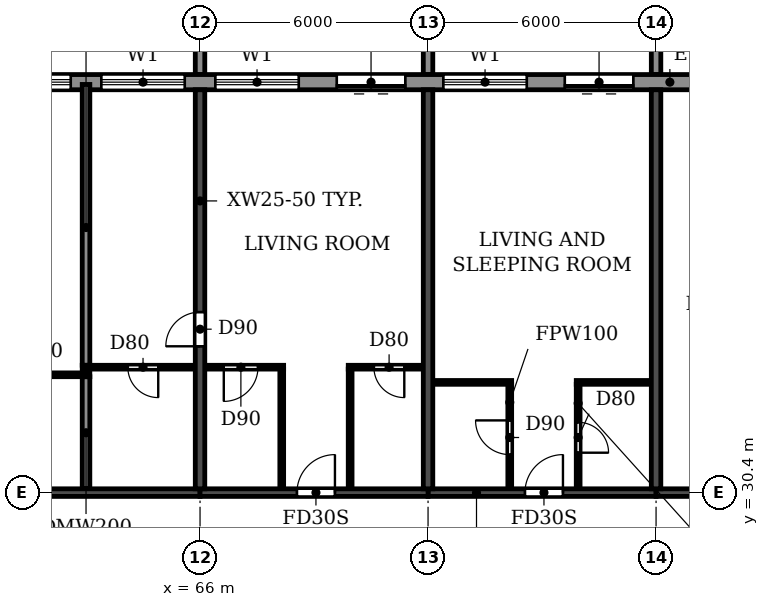
"""IFC4 building model, lengths in metres.
Left out: names, types, materials, properties, quantities, classifications, styles, units other than length and angle.
Written with IfcOpenShell. Run it as: python <this file> out.ifc"""

import sys

from ifc_helpers import new_model, si_unit, direction, frame, frame_2d, origin, place, context, subcontext, project, spatial, polyline, rectangle, outline, extrude, source, transform, mapped, element, fill, save


model = new_model("IFC4")
c1 = context("Model", 3, precision=1e-05, world=origin(), true_north=direction((0.0, 1.0)))
c2 = subcontext(c1, "Body", "Model", "MODEL_VIEW")
j1 = project(units=[si_unit("LENGTHUNIT", "METRE"), si_unit("PLANEANGLEUNIT", "RADIAN")], contexts=[c1])
p1 = place(None, origin())
s1 = spatial("IfcSite", under=j1, at=p1, CompositionType="ELEMENT")
p2 = place(p1, origin())
s2 = spatial("IfcBuilding", under=s1, at=p2, CompositionType="ELEMENT")
p3 = place(p2, frame((0.0, 0.0, 251.1)))
s3 = spatial("IfcBuildingStorey", under=s2, at=p3, CompositionType="ELEMENT", Elevation=251.1)
p4 = place(p3, frame((66.0, 30.5, 0.0), z_axis=(0.0, 0.0, 1.0), x_axis=(0.0, 1.0, 0.0)))
e1 = element("IfcWall", 1, at=p4, inside=s3, PredefinedType="SHEAR", context=c2, shape_type="SweptSolid", body=[
    extrude(rectangle(XDim=10.5, YDim=0.25, at=frame_2d((5.25, 0.0))), origin(), (0.0, 0.0, 1.0), 3.08),
])
p5 = place(p4, frame((3.75, 0.0, 0.0)))
e2 = element("IfcOpeningElement", 2, at=p5, cuts=e1, PredefinedType="OPENING", context=c2, shape_type="SweptSolid", body=[
    extrude(rectangle(XDim=0.9, YDim=2.1, at=frame_2d((0.45, 1.05))), frame((0.0, 0.135, 0.0), z_axis=(0.0, -1.0, 0.0), x_axis=(1.0, 0.0, 0.0)), (0.0, 0.0, 1.0), 0.27),
])
for number, where, z_axis, x_axis in (
    (3, (72.0, 30.5, 0.0), (0.0, 0.0, 1.0), (0.0, 1.0, 0.0)),
    (4, (78.0, 30.5, 0.0), (0.0, 0.0, 1.0), (0.0, 1.0, 0.0)),
):
    element("IfcWall", number, at=place(p3, frame(where, z_axis=z_axis, x_axis=x_axis)), inside=s3, PredefinedType="SHEAR", context=c2, shape_type="SweptSolid", body=[
        extrude(rectangle(XDim=10.5, YDim=0.25, at=frame_2d((5.25, 0.0))), origin(), (0.0, 0.0, 1.0), 3.08),
    ])
p6 = place(p3, frame((60.0, 30.4, 0.0), z_axis=(0.0, 0.0, 1.0), x_axis=(1.0, 0.0, 0.0)))
e5 = element("IfcWall", 5, at=p6, inside=s3, PredefinedType="SHEAR", context=c2, shape_type="SweptSolid", body=[
    extrude(rectangle(XDim=6.0, YDim=0.2, at=frame_2d((3.0, 0.0))), origin(), (0.0, 0.0, 1.0), 2.48),
])
p7 = place(p3, frame((66.0, 30.4, 0.0), z_axis=(0.0, 0.0, 1.0), x_axis=(1.0, 0.0, 0.0)))
e6 = element("IfcWall", 6, at=p7, inside=s3, PredefinedType="SHEAR", context=c2, shape_type="SweptSolid", body=[
    extrude(rectangle(XDim=6.0, YDim=0.2, at=frame_2d((3.0, 0.0))), origin(), (0.0, 0.0, 1.0), 2.48),
])
p8 = place(p7, frame((2.55, 0.0, 0.0)))
e7 = element("IfcOpeningElement", 7, at=p8, cuts=e6, PredefinedType="OPENING", context=c2, shape_type="SweptSolid", body=[
    extrude(rectangle(XDim=1.0, YDim=2.1, at=frame_2d((0.5, 1.05))), frame((0.0, 0.11, 0.0), z_axis=(0.0, -1.0, 0.0), x_axis=(1.0, 0.0, 0.0)), (0.0, 0.0, 1.0), 0.22),
])
p9 = place(p3, frame((72.0, 30.4, 0.0), z_axis=(0.0, 0.0, 1.0), x_axis=(1.0, 0.0, 0.0)))
e8 = element("IfcWall", 8, at=p9, inside=s3, PredefinedType="SHEAR", context=c2, shape_type="SweptSolid", body=[
    extrude(rectangle(XDim=6.0, YDim=0.2, at=frame_2d((3.0, 0.0))), origin(), (0.0, 0.0, 1.0), 2.48),
])
p10 = place(p9, frame((2.55, 0.0, 0.0)))
e9 = element("IfcOpeningElement", 9, at=p10, cuts=e8, PredefinedType="OPENING", context=c2, shape_type="SweptSolid", body=[
    extrude(rectangle(XDim=1.0, YDim=2.1, at=frame_2d((0.5, 1.05))), frame((0.0, 0.11, 0.0), z_axis=(0.0, -1.0, 0.0), x_axis=(1.0, 0.0, 0.0)), (0.0, 0.0, 1.0), 0.22),
])
p11 = place(p3, frame((78.0, 30.4, 0.0), z_axis=(0.0, 0.0, 1.0), x_axis=(1.0, 0.0, 0.0)))
e10 = element("IfcWall", 10, at=p11, inside=s3, PredefinedType="SHEAR", context=c2, shape_type="SweptSolid", body=[
    extrude(rectangle(XDim=5.8, YDim=0.2, at=frame_2d((2.9, 0.0))), origin(), (0.0, 0.0, 1.0), 2.48),
])
p12 = place(p11, frame((2.5, 0.0, 0.0)))
e11 = element("IfcOpeningElement", 11, at=p12, cuts=e10, PredefinedType="OPENING", context=c2, shape_type="SweptSolid", body=[
    extrude(rectangle(XDim=1.0, YDim=2.1, at=frame_2d((0.5, 1.05))), frame((0.0, 0.11, 0.0), z_axis=(0.0, -1.0, 0.0), x_axis=(1.0, 0.0, 0.0)), (0.0, 0.0, 1.0), 0.22),
])
p13 = place(p3, frame((79.317, 41.2, 0.0), z_axis=(0.0, 0.0, 1.0), x_axis=(-1.0, 0.0, 0.0)))
e12 = element("IfcWall", 12, at=p13, inside=s3, PredefinedType="STANDARD", context=c2, shape_type="SweptSolid", body=[
    extrude(rectangle(XDim=56.634, YDim=0.4, at=frame_2d((28.317, 0.0))), origin(), (0.0, 0.0, 1.0), 3.08),
])
p14 = place(p13, frame((52.717, 0.0, 0.9)))
e13 = element("IfcOpeningElement", 13, at=p14, cuts=e12, PredefinedType="OPENING", context=c2, shape_type="SweptSolid", body=[
    extrude(rectangle(XDim=2.2, YDim=1.5, at=frame_2d((1.1, 0.75))), frame((0.0, 0.21, 0.0), z_axis=(0.0, -1.0, 0.0), x_axis=(1.0, 0.0, 0.0)), (0.0, 0.0, 1.0), 0.42),
])
p15 = place(p13, frame((49.717, 0.0, 0.9)))
e14 = element("IfcOpeningElement", 14, at=p15, cuts=e12, PredefinedType="OPENING", context=c2, shape_type="SweptSolid", body=[
    extrude(rectangle(XDim=2.2, YDim=1.5, at=frame_2d((1.1, 0.75))), frame((0.0, 0.21, 0.0), z_axis=(0.0, -1.0, 0.0), x_axis=(1.0, 0.0, 0.0)), (0.0, 0.0, 1.0), 0.42),
])
p16 = place(p13, frame((46.717, 0.0, 0.9)))
e15 = element("IfcOpeningElement", 15, at=p16, cuts=e12, PredefinedType="OPENING", context=c2, shape_type="SweptSolid", body=[
    extrude(rectangle(XDim=2.2, YDim=1.5, at=frame_2d((1.1, 0.75))), frame((0.0, 0.21, 0.0), z_axis=(0.0, -1.0, 0.0), x_axis=(1.0, 0.0, 0.0)), (0.0, 0.0, 1.0), 0.42),
])
p17 = place(p13, frame((43.917, 0.0, 0.0)))
e16 = element("IfcOpeningElement", 16, at=p17, cuts=e12, PredefinedType="OPENING", context=c2, shape_type="SweptSolid", body=[
    extrude(rectangle(XDim=1.8, YDim=2.4, at=frame_2d((0.9, 1.2))), frame((0.0, 0.21, 0.0), z_axis=(0.0, -1.0, 0.0), x_axis=(1.0, 0.0, 0.0)), (0.0, 0.0, 1.0), 0.42),
])
p18 = place(p13, frame((40.717, 0.0, 0.9)))
e17 = element("IfcOpeningElement", 17, at=p18, cuts=e12, PredefinedType="OPENING", context=c2, shape_type="SweptSolid", body=[
    extrude(rectangle(XDim=2.2, YDim=1.5, at=frame_2d((1.1, 0.75))), frame((0.0, 0.21, 0.0), z_axis=(0.0, -1.0, 0.0), x_axis=(1.0, 0.0, 0.0)), (0.0, 0.0, 1.0), 0.42),
])
p19 = place(p13, frame((37.917, 0.0, 0.0)))
e18 = element("IfcOpeningElement", 18, at=p19, cuts=e12, PredefinedType="OPENING", context=c2, shape_type="SweptSolid", body=[
    extrude(rectangle(XDim=1.8, YDim=2.4, at=frame_2d((0.9, 1.2))), frame((0.0, 0.21, 0.0), z_axis=(0.0, -1.0, 0.0), x_axis=(1.0, 0.0, 0.0)), (0.0, 0.0, 1.0), 0.42),
])
p20 = place(p13, frame((34.717, 0.0, 0.9)))
e19 = element("IfcOpeningElement", 19, at=p20, cuts=e12, PredefinedType="OPENING", context=c2, shape_type="SweptSolid", body=[
    extrude(rectangle(XDim=2.2, YDim=1.5, at=frame_2d((1.1, 0.75))), frame((0.0, 0.21, 0.0), z_axis=(0.0, -1.0, 0.0), x_axis=(1.0, 0.0, 0.0)), (0.0, 0.0, 1.0), 0.42),
])
p21 = place(p13, frame((31.717, 0.0, 0.9)))
e20 = element("IfcOpeningElement", 20, at=p21, cuts=e12, PredefinedType="OPENING", context=c2, shape_type="SweptSolid", body=[
    extrude(rectangle(XDim=2.2, YDim=1.5, at=frame_2d((1.1, 0.75))), frame((0.0, 0.21, 0.0), z_axis=(0.0, -1.0, 0.0), x_axis=(1.0, 0.0, 0.0)), (0.0, 0.0, 1.0), 0.42),
])
p22 = place(p13, frame((28.717, 0.0, 0.9)))
e21 = element("IfcOpeningElement", 21, at=p22, cuts=e12, PredefinedType="OPENING", context=c2, shape_type="SweptSolid", body=[
    extrude(rectangle(XDim=2.2, YDim=1.5, at=frame_2d((1.1, 0.75))), frame((0.0, 0.21, 0.0), z_axis=(0.0, -1.0, 0.0), x_axis=(1.0, 0.0, 0.0)), (0.0, 0.0, 1.0), 0.42),
])
p23 = place(p13, frame((25.917, 0.0, 0.0)))
e22 = element("IfcOpeningElement", 22, at=p23, cuts=e12, PredefinedType="OPENING", context=c2, shape_type="SweptSolid", body=[
    extrude(rectangle(XDim=1.8, YDim=2.4, at=frame_2d((0.9, 1.2))), frame((0.0, 0.21, 0.0), z_axis=(0.0, -1.0, 0.0), x_axis=(1.0, 0.0, 0.0)), (0.0, 0.0, 1.0), 0.42),
])
p24 = place(p13, frame((22.917, 0.0, 0.0)))
e23 = element("IfcOpeningElement", 23, at=p24, cuts=e12, PredefinedType="OPENING", context=c2, shape_type="SweptSolid", body=[
    extrude(rectangle(XDim=1.8, YDim=2.4, at=frame_2d((0.9, 1.2))), frame((0.0, 0.21, 0.0), z_axis=(0.0, -1.0, 0.0), x_axis=(1.0, 0.0, 0.0)), (0.0, 0.0, 1.0), 0.42),
])
p25 = place(p13, frame((19.717, 0.0, 0.9)))
e24 = element("IfcOpeningElement", 24, at=p25, cuts=e12, PredefinedType="OPENING", context=c2, shape_type="SweptSolid", body=[
    extrude(rectangle(XDim=2.2, YDim=1.5, at=frame_2d((1.1, 0.75))), frame((0.0, 0.21, 0.0), z_axis=(0.0, -1.0, 0.0), x_axis=(1.0, 0.0, 0.0)), (0.0, 0.0, 1.0), 0.42),
])
p26 = place(p13, frame((16.717, 0.0, 0.9)))
e25 = element("IfcOpeningElement", 25, at=p26, cuts=e12, PredefinedType="OPENING", context=c2, shape_type="SweptSolid", body=[
    extrude(rectangle(XDim=2.2, YDim=1.5, at=frame_2d((1.1, 0.75))), frame((0.0, 0.21, 0.0), z_axis=(0.0, -1.0, 0.0), x_axis=(1.0, 0.0, 0.0)), (0.0, 0.0, 1.0), 0.42),
])
p27 = place(p13, frame((13.717, 0.0, 0.9)))
e26 = element("IfcOpeningElement", 26, at=p27, cuts=e12, PredefinedType="OPENING", context=c2, shape_type="SweptSolid", body=[
    extrude(rectangle(XDim=2.2, YDim=1.5, at=frame_2d((1.1, 0.75))), frame((0.0, 0.21, 0.0), z_axis=(0.0, -1.0, 0.0), x_axis=(1.0, 0.0, 0.0)), (0.0, 0.0, 1.0), 0.42),
])
p28 = place(p13, frame((10.717, 0.0, 0.9)))
e27 = element("IfcOpeningElement", 27, at=p28, cuts=e12, PredefinedType="OPENING", context=c2, shape_type="SweptSolid", body=[
    extrude(rectangle(XDim=2.2, YDim=1.5, at=frame_2d((1.1, 0.75))), frame((0.0, 0.21, 0.0), z_axis=(0.0, -1.0, 0.0), x_axis=(1.0, 0.0, 0.0)), (0.0, 0.0, 1.0), 0.42),
])
p29 = place(p13, frame((7.917, 0.0, 0.0)))
e28 = element("IfcOpeningElement", 28, at=p29, cuts=e12, PredefinedType="OPENING", context=c2, shape_type="SweptSolid", body=[
    extrude(rectangle(XDim=1.8, YDim=2.4, at=frame_2d((0.9, 1.2))), frame((0.0, 0.21, 0.0), z_axis=(0.0, -1.0, 0.0), x_axis=(1.0, 0.0, 0.0)), (0.0, 0.0, 1.0), 0.42),
])
p30 = place(p13, frame((4.717, 0.0, 0.9)))
e29 = element("IfcOpeningElement", 29, at=p30, cuts=e12, PredefinedType="OPENING", context=c2, shape_type="SweptSolid", body=[
    extrude(rectangle(XDim=2.2, YDim=1.5, at=frame_2d((1.1, 0.75))), frame((0.0, 0.21, 0.0), z_axis=(0.0, -1.0, 0.0), x_axis=(1.0, 0.0, 0.0)), (0.0, 0.0, 1.0), 0.42),
])
p31 = place(p13, frame((1.917, 0.0, 0.0)))
e30 = element("IfcOpeningElement", 30, at=p31, cuts=e12, PredefinedType="OPENING", context=c2, shape_type="SweptSolid", body=[
    extrude(rectangle(XDim=1.8, YDim=2.4, at=frame_2d((0.9, 1.2))), frame((0.0, 0.21, 0.0), z_axis=(0.0, -1.0, 0.0), x_axis=(1.0, 0.0, 0.0)), (0.0, 0.0, 1.0), 0.42),
])
m1 = source(origin(), c2, "Body", "SweptSolid", [
    extrude(outline(polyline([(0.0, 0.0), (0.25, 0.0), (0.25, 3.1), (0.0, 3.1), (0.0, 0.0)])), origin(), (0.0, 0.0, 1.0), 3.1),
])
for number, where in (
    (31, (65.875, 41.4, 0.0)),
    (32, (71.875, 41.4, 0.0)),
    (33, (77.875, 41.4, 0.0)),
):
    element("IfcWall", number, at=place(p3, frame(where)), inside=s3, PredefinedType="STANDARD", context=c2, shape_type="MappedRepresentation", body=[
        mapped(m1, transform((0.0, 0.0, 0.0))),
    ])
p32 = place(p3, frame((63.0, 30.51, 0.0), z_axis=(0.0, 0.0, 1.0), x_axis=(0.0, 1.0, 0.0)))
e34 = element("IfcWall", 34, at=p32, inside=s3, PredefinedType="PARTITIONING", context=c2, shape_type="SweptSolid", body=[
    extrude(rectangle(XDim=2.94, YDim=0.2, at=frame_2d((1.47, 0.0))), origin(), (0.0, 0.0, 1.0), 3.08),
])
p33 = place(p3, frame((63.0, 33.75, 0.0), z_axis=(0.0, 0.0, 1.0), x_axis=(0.0, 1.0, 0.0)))
e35 = element("IfcWall", 35, at=p33, inside=s3, PredefinedType="PARTITIONING", context=c2, shape_type="SweptSolid", body=[
    extrude(rectangle(XDim=7.39, YDim=0.2, at=frame_2d((3.695, 0.0))), origin(), (0.0, 0.0, 1.0), 3.08),
])
p34 = place(p3, frame((72.135, 33.3, 0.0), z_axis=(0.0, 0.0, 1.0), x_axis=(1.0, 0.0, 0.0)))
e36 = element("IfcWall", 36, at=p34, inside=s3, PredefinedType="PARTITIONING", context=c2, shape_type="SweptSolid", body=[
    extrude(rectangle(XDim=2.065, YDim=0.1, at=frame_2d((1.032, 0.0))), origin(), (0.0, 0.0, 1.0), 3.08),
])
p35 = place(p3, frame((75.9, 33.3, 0.0), z_axis=(0.0, 0.0, 1.0), x_axis=(1.0, 0.0, 0.0)))
e37 = element("IfcWall", 37, at=p35, inside=s3, PredefinedType="PARTITIONING", context=c2, shape_type="SweptSolid", body=[
    extrude(rectangle(XDim=1.965, YDim=0.1, at=frame_2d((0.982, 0.0))), origin(), (0.0, 0.0, 1.0), 3.08),
])
p36 = place(p3, frame((60.135, 33.5, 0.0), z_axis=(0.0, 0.0, 1.0), x_axis=(1.0, 0.0, 0.0)))
e38 = element("IfcWall", 38, at=p36, inside=s3, PredefinedType="PARTITIONING", context=c2, shape_type="SweptSolid", body=[
    extrude(rectangle(XDim=2.965, YDim=0.1, at=frame_2d((1.482, 0.0))), origin(), (0.0, 0.0, 1.0), 3.08),
])
p37 = place(p36, frame((0.965, 0.0, 0.0)))
e39 = element("IfcOpeningElement", 39, at=p37, cuts=e38, PredefinedType="OPENING", context=c2, shape_type="SweptSolid", body=[
    extrude(rectangle(XDim=0.8, YDim=2.1, at=frame_2d((0.4, 1.05))), frame((0.0, 0.06, 0.0), z_axis=(0.0, -1.0, 0.0), x_axis=(1.0, 0.0, 0.0)), (0.0, 0.0, 1.0), 0.12),
])
p38 = place(p3, frame((62.9, 33.7, 0.0), z_axis=(0.0, 0.0, 1.0), x_axis=(1.0, 0.0, 0.0)))
e40 = element("IfcWall", 40, at=p38, inside=s3, PredefinedType="PARTITIONING", context=c2, shape_type="SweptSolid", body=[
    extrude(rectangle(XDim=2.965, YDim=0.1, at=frame_2d((1.482, 0.0))), origin(), (0.0, 0.0, 1.0), 3.08),
])
p39 = place(p38, frame((1.2, 0.0, 0.0)))
e41 = element("IfcOpeningElement", 41, at=p39, cuts=e40, PredefinedType="OPENING", context=c2, shape_type="SweptSolid", body=[
    extrude(rectangle(XDim=0.8, YDim=2.1, at=frame_2d((0.4, 1.05))), frame((0.0, 0.06, 0.0), z_axis=(0.0, -1.0, 0.0), x_axis=(1.0, 0.0, 0.0)), (0.0, 0.0, 1.0), 0.12),
])
p40 = place(p3, frame((66.135, 33.7, 0.0), z_axis=(0.0, 0.0, 1.0), x_axis=(1.0, 0.0, 0.0)))
e42 = element("IfcWall", 42, at=p40, inside=s3, PredefinedType="PARTITIONING", context=c2, shape_type="SweptSolid", body=[
    extrude(rectangle(XDim=2.065, YDim=0.1, at=frame_2d((1.032, 0.0))), origin(), (0.0, 0.0, 1.0), 3.08),
])
p41 = place(p40, frame((0.49, 0.0, 0.0)))
e43 = element("IfcOpeningElement", 43, at=p41, cuts=e42, PredefinedType="OPENING", context=c2, shape_type="SweptSolid", body=[
    extrude(rectangle(XDim=0.9, YDim=2.1, at=frame_2d((0.45, 1.05))), frame((0.0, 0.06, 0.0), z_axis=(0.0, -1.0, 0.0), x_axis=(1.0, 0.0, 0.0)), (0.0, 0.0, 1.0), 0.12),
])
p42 = place(p3, frame((69.9, 33.7, 0.0), z_axis=(0.0, 0.0, 1.0), x_axis=(1.0, 0.0, 0.0)))
e44 = element("IfcWall", 44, at=p42, inside=s3, PredefinedType="PARTITIONING", context=c2, shape_type="SweptSolid", body=[
    extrude(rectangle(XDim=1.965, YDim=0.1, at=frame_2d((0.982, 0.0))), origin(), (0.0, 0.0, 1.0), 3.08),
])
p43 = place(p42, frame((0.675, 0.0, 0.0)))
e45 = element("IfcOpeningElement", 45, at=p43, cuts=e44, PredefinedType="OPENING", context=c2, shape_type="SweptSolid", body=[
    extrude(rectangle(XDim=0.8, YDim=2.1, at=frame_2d((0.4, 1.05))), frame((0.0, 0.06, 0.0), z_axis=(0.0, -1.0, 0.0), x_axis=(1.0, 0.0, 0.0)), (0.0, 0.0, 1.0), 0.12),
])
for number, where, z_axis, x_axis in (
    (46, (68.15, 30.51, 0.0), (0.0, 0.0, 1.0), (0.0, 1.0, 0.0)),
    (47, (69.95, 30.51, 0.0), (0.0, 0.0, 1.0), (0.0, 1.0, 0.0)),
):
    element("IfcWall", number, at=place(p3, frame(where, z_axis=z_axis, x_axis=x_axis)), inside=s3, PredefinedType="PARTITIONING", context=c2, shape_type="SweptSolid", body=[
        extrude(rectangle(XDim=3.14, YDim=0.1, at=frame_2d((1.57, 0.0))), origin(), (0.0, 0.0, 1.0), 3.08),
    ])
p44 = place(p3, frame((74.15, 30.51, 0.0), z_axis=(0.0, 0.0, 1.0), x_axis=(0.0, 1.0, 0.0)))
e48 = element("IfcWall", 48, at=p44, inside=s3, PredefinedType="PARTITIONING", context=c2, shape_type="SweptSolid", body=[
    extrude(rectangle(XDim=2.74, YDim=0.1, at=frame_2d((1.37, 0.0))), origin(), (0.0, 0.0, 1.0), 3.08),
])
p45 = place(p44, frame((0.89, 0.0, 0.0)))
e49 = element("IfcOpeningElement", 49, at=p45, cuts=e48, PredefinedType="OPENING", context=c2, shape_type="SweptSolid", body=[
    extrude(rectangle(XDim=0.9, YDim=2.1, at=frame_2d((0.45, 1.05))), frame((0.0, 0.06, 0.0), z_axis=(0.0, -1.0, 0.0), x_axis=(1.0, 0.0, 0.0)), (0.0, 0.0, 1.0), 0.12),
])
p46 = place(p3, frame((75.95, 30.51, 0.0), z_axis=(0.0, 0.0, 1.0), x_axis=(0.0, 1.0, 0.0)))
e50 = element("IfcWall", 50, at=p46, inside=s3, PredefinedType="PARTITIONING", context=c2, shape_type="SweptSolid", body=[
    extrude(rectangle(XDim=2.74, YDim=0.1, at=frame_2d((1.37, 0.0))), origin(), (0.0, 0.0, 1.0), 3.08),
])
p47 = place(p46, frame((0.94, 0.0, 0.0)))
e51 = element("IfcOpeningElement", 51, at=p47, cuts=e50, PredefinedType="OPENING", context=c2, shape_type="SweptSolid", body=[
    extrude(rectangle(XDim=0.8, YDim=2.1, at=frame_2d((0.4, 1.05))), frame((0.0, 0.06, 0.0), z_axis=(0.0, -1.0, 0.0), x_axis=(1.0, 0.0, 0.0)), (0.0, 0.0, 1.0), 0.12),
])
p48 = place(p26, origin())
e52 = element("IfcWindow", 52, at=p48, inside=s3, PartitioningType="DOUBLE_PANEL_HORIZONTAL", PredefinedType="WINDOW", context=c2, shape_type="SweptSolid", body=[
    extrude(rectangle(XDim=2.2, YDim=1.5, at=frame_2d((1.1, 0.75))), frame((0.0, 0.03, 0.0), z_axis=(0.0, -1.0, 0.0), x_axis=(1.0, 0.0, 0.0)), (0.0, 0.0, 1.0), 0.06),
])
fill(e25, e52)
p49 = place(p27, origin())
e53 = element("IfcWindow", 53, at=p49, inside=s3, PartitioningType="DOUBLE_PANEL_HORIZONTAL", PredefinedType="WINDOW", context=c2, shape_type="SweptSolid", body=[
    extrude(rectangle(XDim=2.2, YDim=1.5, at=frame_2d((1.1, 0.75))), frame((0.0, 0.03, 0.0), z_axis=(0.0, -1.0, 0.0), x_axis=(1.0, 0.0, 0.0)), (0.0, 0.0, 1.0), 0.06),
])
fill(e26, e53)
p50 = place(p28, origin())
e54 = element("IfcWindow", 54, at=p50, inside=s3, PartitioningType="DOUBLE_PANEL_HORIZONTAL", PredefinedType="WINDOW", context=c2, shape_type="SweptSolid", body=[
    extrude(rectangle(XDim=2.2, YDim=1.5, at=frame_2d((1.1, 0.75))), frame((0.0, 0.03, 0.0), z_axis=(0.0, -1.0, 0.0), x_axis=(1.0, 0.0, 0.0)), (0.0, 0.0, 1.0), 0.06),
])
fill(e27, e54)
p51 = place(p29, origin())
e55 = element("IfcDoor", 55, at=p51, inside=s3, OperationType="DOUBLE_DOOR_SLIDING", PredefinedType="DOOR", context=c2, shape_type="SweptSolid", body=[
    extrude(rectangle(XDim=1.8, YDim=2.4, at=frame_2d((0.9, 1.2))), frame((0.0, 0.025, 0.0), z_axis=(0.0, -1.0, 0.0), x_axis=(1.0, 0.0, 0.0)), (0.0, 0.0, 1.0), 0.05),
])
fill(e28, e55)
p52 = place(p30, origin())
e56 = element("IfcWindow", 56, at=p52, inside=s3, PartitioningType="DOUBLE_PANEL_HORIZONTAL", PredefinedType="WINDOW", context=c2, shape_type="SweptSolid", body=[
    extrude(rectangle(XDim=2.2, YDim=1.5, at=frame_2d((1.1, 0.75))), frame((0.0, 0.03, 0.0), z_axis=(0.0, -1.0, 0.0), x_axis=(1.0, 0.0, 0.0)), (0.0, 0.0, 1.0), 0.06),
])
fill(e29, e56)
p53 = place(p31, origin())
e57 = element("IfcDoor", 57, at=p53, inside=s3, OperationType="DOUBLE_DOOR_SLIDING", PredefinedType="DOOR", context=c2, shape_type="SweptSolid", body=[
    extrude(rectangle(XDim=1.8, YDim=2.4, at=frame_2d((0.9, 1.2))), frame((0.0, 0.025, 0.0), z_axis=(0.0, -1.0, 0.0), x_axis=(1.0, 0.0, 0.0)), (0.0, 0.0, 1.0), 0.05),
])
fill(e30, e57)
p54 = place(p39, frame((0.8, 0.0, 0.0), z_axis=(0.0, 0.0, 1.0), x_axis=(-1.0, 0.0, 0.0)))
e58 = element("IfcDoor", 58, at=p54, inside=s3, OperationType="SINGLE_SWING_LEFT", PredefinedType="DOOR", context=c2, shape_type="SweptSolid", body=[
    extrude(rectangle(XDim=0.8, YDim=2.1, at=frame_2d((0.4, 1.05))), frame((0.0, 0.025, 0.0), z_axis=(0.0, -1.0, 0.0), x_axis=(1.0, 0.0, 0.0)), (0.0, 0.0, 1.0), 0.05),
])
fill(e41, e58)
p55 = place(p5, origin())
e59 = element("IfcDoor", 59, at=p55, inside=s3, OperationType="SINGLE_SWING_LEFT", PredefinedType="DOOR", context=c2, shape_type="SweptSolid", body=[
    extrude(rectangle(XDim=0.9, YDim=2.1, at=frame_2d((0.45, 1.05))), frame((0.0, 0.025, 0.0), z_axis=(0.0, -1.0, 0.0), x_axis=(1.0, 0.0, 0.0)), (0.0, 0.0, 1.0), 0.05),
])
fill(e2, e59)
p56 = place(p41, frame((0.9, 0.0, 0.0), z_axis=(0.0, 0.0, 1.0), x_axis=(-1.0, 0.0, 0.0)))
e60 = element("IfcDoor", 60, at=p56, inside=s3, OperationType="SINGLE_SWING_RIGHT", PredefinedType="DOOR", context=c2, shape_type="SweptSolid", body=[
    extrude(rectangle(XDim=0.9, YDim=2.1, at=frame_2d((0.45, 1.05))), frame((0.0, 0.025, 0.0), z_axis=(0.0, -1.0, 0.0), x_axis=(1.0, 0.0, 0.0)), (0.0, 0.0, 1.0), 0.05),
])
fill(e43, e60)
p57 = place(p8, origin())
e61 = element("IfcDoor", 61, at=p57, inside=s3, OperationType="SINGLE_SWING_RIGHT", PredefinedType="DOOR", context=c2, shape_type="SweptSolid", body=[
    extrude(rectangle(XDim=1.0, YDim=2.1, at=frame_2d((0.5, 1.05))), frame((0.0, 0.025, 0.0), z_axis=(0.0, -1.0, 0.0), x_axis=(1.0, 0.0, 0.0)), (0.0, 0.0, 1.0), 0.05),
])
fill(e7, e61)
p58 = place(p43, frame((0.8, 0.0, 0.0), z_axis=(0.0, 0.0, 1.0), x_axis=(-1.0, 0.0, 0.0)))
e62 = element("IfcDoor", 62, at=p58, inside=s3, OperationType="SINGLE_SWING_LEFT", PredefinedType="DOOR", context=c2, shape_type="SweptSolid", body=[
    extrude(rectangle(XDim=0.8, YDim=2.1, at=frame_2d((0.4, 1.05))), frame((0.0, 0.025, 0.0), z_axis=(0.0, -1.0, 0.0), x_axis=(1.0, 0.0, 0.0)), (0.0, 0.0, 1.0), 0.05),
])
fill(e45, e62)
p59 = place(p45, origin())
e63 = element("IfcDoor", 63, at=p59, inside=s3, OperationType="SINGLE_SWING_RIGHT", PredefinedType="DOOR", context=c2, shape_type="SweptSolid", body=[
    extrude(rectangle(XDim=0.9, YDim=2.1, at=frame_2d((0.45, 1.05))), frame((0.0, 0.025, 0.0), z_axis=(0.0, -1.0, 0.0), x_axis=(1.0, 0.0, 0.0)), (0.0, 0.0, 1.0), 0.05),
])
fill(e49, e63)
p60 = place(p10, origin())
e64 = element("IfcDoor", 64, at=p60, inside=s3, OperationType="SINGLE_SWING_RIGHT", PredefinedType="DOOR", context=c2, shape_type="SweptSolid", body=[
    extrude(rectangle(XDim=1.0, YDim=2.1, at=frame_2d((0.5, 1.05))), frame((0.0, 0.025, 0.0), z_axis=(0.0, -1.0, 0.0), x_axis=(1.0, 0.0, 0.0)), (0.0, 0.0, 1.0), 0.05),
])
fill(e9, e64)
p61 = place(p47, frame((0.8, 0.0, 0.0), z_axis=(0.0, 0.0, 1.0), x_axis=(-1.0, 0.0, 0.0)))
e65 = element("IfcDoor", 65, at=p61, inside=s3, OperationType="SINGLE_SWING_RIGHT", PredefinedType="DOOR", context=c2, shape_type="SweptSolid", body=[
    extrude(rectangle(XDim=0.8, YDim=2.1, at=frame_2d((0.4, 1.05))), frame((0.0, 0.025, 0.0), z_axis=(0.0, -1.0, 0.0), x_axis=(1.0, 0.0, 0.0)), (0.0, 0.0, 1.0), 0.05),
])
fill(e51, e65)
save(model, sys.argv[1])
